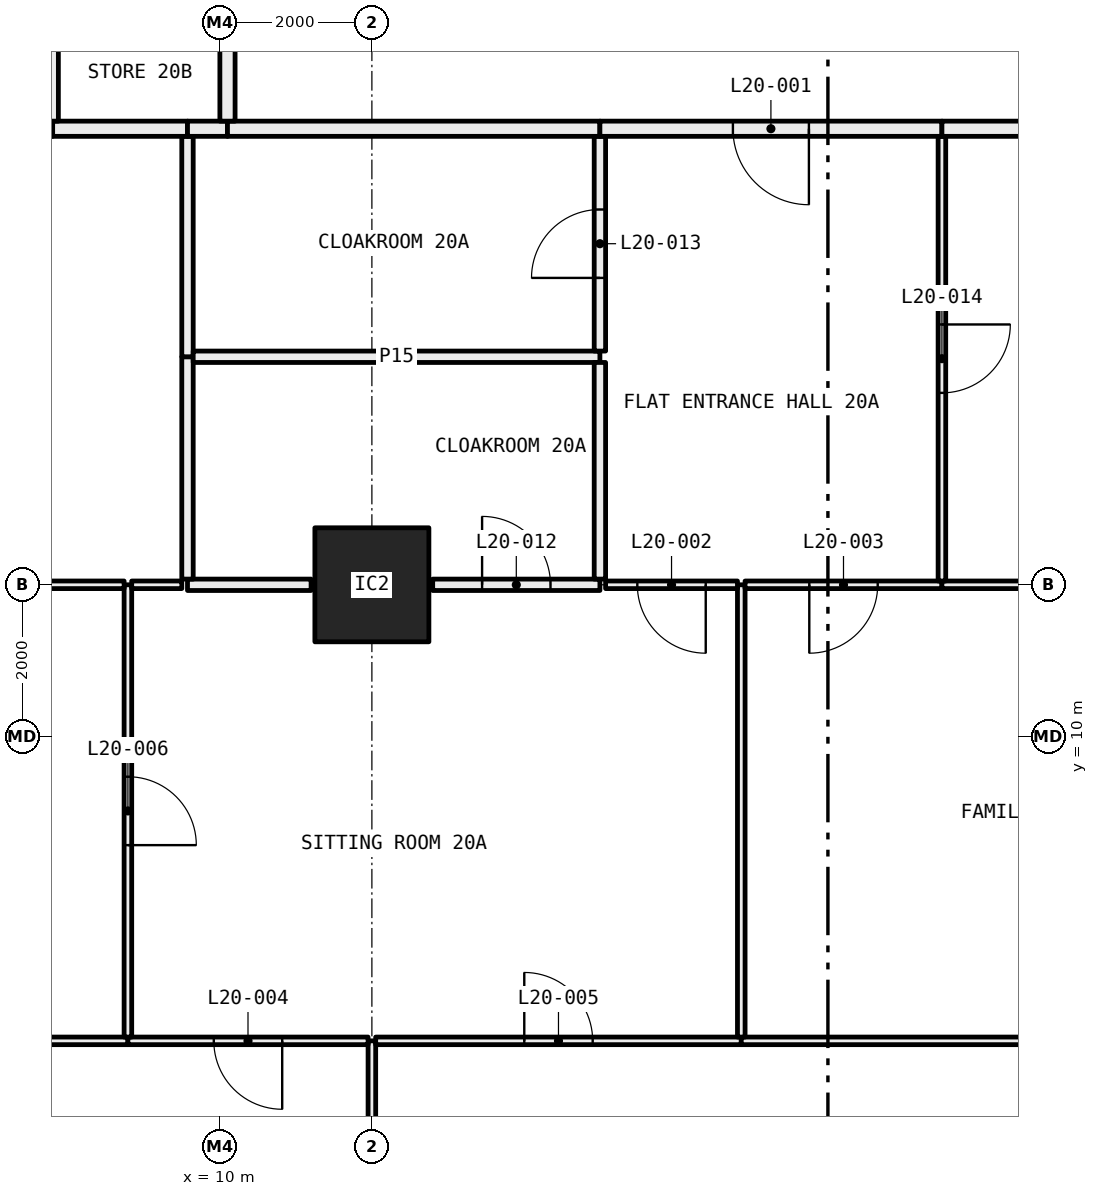
"""IFC4 building model, lengths in metres.
Left out: names, types, materials, properties, quantities, classifications, styles, units other than length and angle.
Written with IfcOpenShell. Run it as: python <this file> out.ifc"""

import sys

from ifc_helpers import new_model, si_unit, direction, frame, frame_2d, origin, origin_2d, place, context, subcontext, project, spatial, rectangle, hollow_rectangle, extrude, element, fill, save


model = new_model("IFC4")
c1 = context("Model", 3, precision=1e-05, world=origin(), true_north=direction((0.0, 1.0)))
c2 = subcontext(c1, "Body", "Model", "MODEL_VIEW")
j1 = project(units=[si_unit("LENGTHUNIT", "METRE"), si_unit("PLANEANGLEUNIT", "RADIAN")], contexts=[c1])
p1 = place(None, origin())
s1 = spatial("IfcSite", under=j1, at=p1, CompositionType="ELEMENT")
p2 = place(p1, origin())
s2 = spatial("IfcBuilding", under=s1, at=p2, CompositionType="ELEMENT")
p3 = place(p2, frame((0.0, 0.0, 81.75)))
s3 = spatial("IfcBuildingStorey", under=s2, at=p3, CompositionType="ELEMENT", Elevation=81.75)
p4 = place(p3, frame((12.0, 12.0, 0.0), z_axis=(0.0, 0.0, 1.0), x_axis=(1.0, 0.0, 0.0)))
e1 = element("IfcColumn", 1, at=p4, inside=s3, PredefinedType="COLUMN", context=c2, shape_type="SweptSolid", body=[
    extrude(hollow_rectangle(XDim=1.5, YDim=1.5, WallThickness=0.065, at=origin_2d()), origin(), (0.0, 0.0, 1.0), 3.05),
])
p5 = place(p3, frame((12.0, 0.72, 0.0), z_axis=(0.0, 0.0, 1.0), x_axis=(0.0, 1.0, 0.0)))
e2 = element("IfcWall", 2, at=p5, inside=s3, PredefinedType="PARTITIONING", context=c2, shape_type="SweptSolid", body=[
    extrude(rectangle(XDim=5.28, YDim=0.1, at=frame_2d((2.64, 0.0))), origin(), (0.0, 0.0, 1.0), 2.45),
])
p6 = place(p3, frame((8.79, 6.0, 0.0), z_axis=(0.0, 0.0, 1.0), x_axis=(-1.0, 0.0, 0.0)))
e3 = element("IfcWall", 3, at=p6, inside=s3, PredefinedType="PARTITIONING", context=c2, shape_type="SweptSolid", body=[
    extrude(rectangle(XDim=2.07, YDim=0.1, at=frame_2d((1.035, 0.0))), origin(), (0.0, 0.0, 1.0), 3.05),
])
p7 = place(p3, frame((11.95, 6.0, 0.0), z_axis=(0.0, 0.0, 1.0), x_axis=(-1.0, 0.0, 0.0)))
e4 = element("IfcWall", 4, at=p7, inside=s3, PredefinedType="PARTITIONING", context=c2, shape_type="SweptSolid", body=[
    extrude(rectangle(XDim=3.16, YDim=0.1, at=frame_2d((1.58, 0.0))), origin(), (0.0, 0.0, 1.0), 2.45),
])
p8 = place(p7, frame((1.13, 0.0, 0.0)))
e5 = element("IfcOpeningElement", 5, at=p8, cuts=e4, PredefinedType="OPENING", context=c2, shape_type="SweptSolid", body=[
    extrude(rectangle(XDim=0.9, YDim=2.1, at=frame_2d((0.45, 1.05))), frame((0.0, 0.06, 0.0), z_axis=(0.0, -1.0, 0.0), x_axis=(1.0, 0.0, 0.0)), (0.0, 0.0, 1.0), 0.12),
])
p9 = place(p3, frame((16.86, 6.0, 0.0), z_axis=(0.0, 0.0, 1.0), x_axis=(-1.0, 0.0, 0.0)))
e6 = element("IfcWall", 6, at=p9, inside=s3, PredefinedType="PARTITIONING", context=c2, shape_type="SweptSolid", body=[
    extrude(rectangle(XDim=4.81, YDim=0.1, at=frame_2d((2.405, 0.0))), origin(), (0.0, 0.0, 1.0), 2.45),
])
p10 = place(p9, frame((1.955, 0.0, 0.0)))
e7 = element("IfcOpeningElement", 7, at=p10, cuts=e6, PredefinedType="OPENING", context=c2, shape_type="SweptSolid", body=[
    extrude(rectangle(XDim=0.9, YDim=2.1, at=frame_2d((0.45, 1.05))), frame((0.0, 0.06, 0.0), z_axis=(0.0, -1.0, 0.0), x_axis=(1.0, 0.0, 0.0)), (0.0, 0.0, 1.0), 0.12),
])
p11 = place(p3, frame((23.95, 6.0, 0.0), z_axis=(0.0, 0.0, 1.0), x_axis=(-1.0, 0.0, 0.0)))
e8 = element("IfcWall", 8, at=p11, inside=s3, PredefinedType="PARTITIONING", context=c2, shape_type="SweptSolid", body=[
    extrude(rectangle(XDim=7.09, YDim=0.1, at=frame_2d((3.545, 0.0))), origin(), (0.0, 0.0, 1.0), 2.45),
])
p12 = place(p3, frame((8.79, 6.05, 0.0), z_axis=(0.0, 0.0, 1.0), x_axis=(0.0, 1.0, 0.0)))
e9 = element("IfcWall", 9, at=p12, inside=s3, PredefinedType="PARTITIONING", context=c2, shape_type="SweptSolid", body=[
    extrude(rectangle(XDim=5.95, YDim=0.1, at=frame_2d((2.975, 0.0))), origin(), (0.0, 0.0, 1.0), 2.45),
])
p13 = place(p12, frame((2.525, 0.0, 0.0)))
e10 = element("IfcOpeningElement", 10, at=p13, cuts=e9, PredefinedType="OPENING", context=c2, shape_type="SweptSolid", body=[
    extrude(rectangle(XDim=0.9, YDim=2.1, at=frame_2d((0.45, 1.05))), frame((0.0, 0.06, 0.0), z_axis=(0.0, -1.0, 0.0), x_axis=(1.0, 0.0, 0.0)), (0.0, 0.0, 1.0), 0.12),
])
p14 = place(p3, frame((8.74, 12.0, 0.0), z_axis=(0.0, 0.0, 1.0), x_axis=(-1.0, 0.0, 0.0)))
e11 = element("IfcWall", 11, at=p14, inside=s3, PredefinedType="PARTITIONING", context=c2, shape_type="SweptSolid", body=[
    extrude(rectangle(XDim=8.02, YDim=0.1, at=frame_2d((4.01, 0.0))), origin(), (0.0, 0.0, 1.0), 2.45),
])
p15 = place(p14, frame((3.56, 0.0, 0.0)))
e12 = element("IfcOpeningElement", 12, at=p15, cuts=e11, PredefinedType="OPENING", context=c2, shape_type="SweptSolid", body=[
    extrude(rectangle(XDim=0.9, YDim=2.1, at=frame_2d((0.45, 1.05))), frame((0.0, 0.06, 0.0), z_axis=(0.0, -1.0, 0.0), x_axis=(1.0, 0.0, 0.0)), (0.0, 0.0, 1.0), 0.12),
])
p16 = place(p3, frame((16.86, 6.05, 0.0), z_axis=(0.0, 0.0, 1.0), x_axis=(0.0, 1.0, 0.0)))
e13 = element("IfcWall", 13, at=p16, inside=s3, PredefinedType="PARTITIONING", context=c2, shape_type="SweptSolid", body=[
    extrude(rectangle(XDim=5.95, YDim=0.1, at=frame_2d((2.975, 0.0))), origin(), (0.0, 0.0, 1.0), 2.45),
])
p17 = place(p3, frame((9.499, 12.0, 0.0), z_axis=(0.0, 0.0, 1.0), x_axis=(-1.0, 0.0, 0.0)))
e14 = element("IfcWall", 14, at=p17, inside=s3, PredefinedType="PARTITIONING", context=c2, shape_type="SweptSolid", body=[
    extrude(rectangle(XDim=0.659, YDim=0.1, at=frame_2d((0.33, 0.0))), origin(), (0.0, 0.0, 1.0), 2.45),
])
p18 = place(p3, frame((11.2, 12.0, 0.0), z_axis=(0.0, 0.0, 1.0), x_axis=(-1.0, 0.0, 0.0)))
e15 = element("IfcWall", 15, at=p18, inside=s3, PredefinedType="PARTITIONING", context=c2, shape_type="SweptSolid", body=[
    extrude(rectangle(XDim=1.626, YDim=0.15, at=frame_2d((0.813, 0.0))), origin(), (0.0, 0.0, 1.0), 2.45),
])
p19 = place(p3, frame((15.0, 12.0, 0.0), z_axis=(0.0, 0.0, 1.0), x_axis=(-1.0, 0.0, 0.0)))
e16 = element("IfcWall", 16, at=p19, inside=s3, PredefinedType="PARTITIONING", context=c2, shape_type="SweptSolid", body=[
    extrude(rectangle(XDim=2.2, YDim=0.15, at=frame_2d((1.1, 0.0))), origin(), (0.0, 0.0, 1.0), 2.45),
])
p20 = place(p19, frame((0.65, 0.0, 0.0)))
e17 = element("IfcOpeningElement", 17, at=p20, cuts=e16, PredefinedType="OPENING", context=c2, shape_type="SweptSolid", body=[
    extrude(rectangle(XDim=0.9, YDim=2.1, at=frame_2d((0.45, 1.05))), frame((0.0, 0.085, 0.0), z_axis=(0.0, -1.0, 0.0), x_axis=(1.0, 0.0, 0.0)), (0.0, 0.0, 1.0), 0.17),
])
p21 = place(p3, frame((16.81, 12.0, 0.0), z_axis=(0.0, 0.0, 1.0), x_axis=(-1.0, 0.0, 0.0)))
e18 = element("IfcWall", 18, at=p21, inside=s3, PredefinedType="PARTITIONING", context=c2, shape_type="SweptSolid", body=[
    extrude(rectangle(XDim=1.735, YDim=0.1, at=frame_2d((0.868, 0.0))), origin(), (0.0, 0.0, 1.0), 2.45),
])
p22 = place(p21, frame((0.417, 0.0, 0.0)))
e19 = element("IfcOpeningElement", 19, at=p22, cuts=e18, PredefinedType="OPENING", context=c2, shape_type="SweptSolid", body=[
    extrude(rectangle(XDim=0.9, YDim=2.1, at=frame_2d((0.45, 1.05))), frame((0.0, 0.06, 0.0), z_axis=(0.0, -1.0, 0.0), x_axis=(1.0, 0.0, 0.0)), (0.0, 0.0, 1.0), 0.12),
])
p23 = place(p3, frame((19.5, 12.0, 0.0), z_axis=(0.0, 0.0, 1.0), x_axis=(-1.0, 0.0, 0.0)))
e20 = element("IfcWall", 20, at=p23, inside=s3, PredefinedType="PARTITIONING", context=c2, shape_type="SweptSolid", body=[
    extrude(rectangle(XDim=2.59, YDim=0.1, at=frame_2d((1.295, 0.0))), origin(), (0.0, 0.0, 1.0), 2.45),
])
p24 = place(p23, frame((0.845, 0.0, 0.0)))
e21 = element("IfcOpeningElement", 21, at=p24, cuts=e20, PredefinedType="OPENING", context=c2, shape_type="SweptSolid", body=[
    extrude(rectangle(XDim=0.9, YDim=2.1, at=frame_2d((0.45, 1.05))), frame((0.0, 0.06, 0.0), z_axis=(0.0, -1.0, 0.0), x_axis=(1.0, 0.0, 0.0)), (0.0, 0.0, 1.0), 0.12),
])
p25 = place(p3, frame((23.2, 12.0, 0.0), z_axis=(0.0, 0.0, 1.0), x_axis=(-1.0, 0.0, 0.0)))
e22 = element("IfcWall", 22, at=p25, inside=s3, PredefinedType="PARTITIONING", context=c2, shape_type="SweptSolid", body=[
    extrude(rectangle(XDim=3.7, YDim=0.1, at=frame_2d((1.85, 0.0))), origin(), (0.0, 0.0, 1.0), 2.45),
])
p26 = place(p3, frame((9.574, 12.075, 0.0), z_axis=(0.0, 0.0, 1.0), x_axis=(0.0, 1.0, 0.0)))
e23 = element("IfcWall", 23, at=p26, inside=s3, PredefinedType="PARTITIONING", context=c2, shape_type="SweptSolid", body=[
    extrude(rectangle(XDim=2.925, YDim=0.15, at=frame_2d((1.462, 0.0))), origin(), (0.0, 0.0, 1.0), 2.45),
])
p27 = place(p3, frame((9.574, 15.0, 0.0), z_axis=(0.0, 0.0, 1.0), x_axis=(0.0, 1.0, 0.0)))
e24 = element("IfcWall", 24, at=p27, inside=s3, PredefinedType="PARTITIONING", context=c2, shape_type="SweptSolid", body=[
    extrude(rectangle(XDim=2.9, YDim=0.15, at=frame_2d((1.45, 0.0))), origin(), (0.0, 0.0, 1.0), 3.05),
])
p28 = place(p3, frame((7.8, 18.0, 0.0), z_axis=(0.0, 0.0, 1.0), x_axis=(-1.0, 0.0, 0.0)))
e25 = element("IfcWall", 25, at=p28, inside=s3, PredefinedType="PARTITIONING", context=c2, shape_type="SweptSolid", body=[
    extrude(rectangle(XDim=1.8, YDim=0.2, at=frame_2d((0.9, 0.0))), origin(), (0.0, 0.0, 1.0), 3.05),
])
p29 = place(p3, frame((9.574, 18.0, 0.0), z_axis=(0.0, 0.0, 1.0), x_axis=(-1.0, 0.0, 0.0)))
e26 = element("IfcWall", 26, at=p29, inside=s3, PredefinedType="PARTITIONING", context=c2, shape_type="SweptSolid", body=[
    extrude(rectangle(XDim=1.774, YDim=0.2, at=frame_2d((0.887, 0.0))), origin(), (0.0, 0.0, 1.0), 3.05),
])
p30 = place(p3, frame((15.0, 15.0, 0.0), z_axis=(0.0, 0.0, 1.0), x_axis=(-1.0, 0.0, 0.0)))
e27 = element("IfcWall", 27, at=p30, inside=s3, PredefinedType="PARTITIONING", context=c2, shape_type="SweptSolid", body=[
    extrude(rectangle(XDim=5.351, YDim=0.15, at=frame_2d((2.676, 0.0))), origin(), (0.0, 0.0, 1.0), 3.05),
])
p31 = place(p3, frame((15.0, 12.075, 0.0), z_axis=(0.0, 0.0, 1.0), x_axis=(0.0, 1.0, 0.0)))
e28 = element("IfcWall", 28, at=p31, inside=s3, PredefinedType="PARTITIONING", context=c2, shape_type="SweptSolid", body=[
    extrude(rectangle(XDim=2.85, YDim=0.15, at=frame_2d((1.425, 0.0))), origin(), (0.0, 0.0, 1.0), 2.45),
])
p32 = place(p3, frame((15.0, 15.075, 0.0), z_axis=(0.0, 0.0, 1.0), x_axis=(0.0, 1.0, 0.0)))
e29 = element("IfcWall", 29, at=p32, inside=s3, PredefinedType="PARTITIONING", context=c2, shape_type="SweptSolid", body=[
    extrude(rectangle(XDim=2.825, YDim=0.15, at=frame_2d((1.413, 0.0))), origin(), (0.0, 0.0, 1.0), 3.05),
])
p33 = place(p32, frame((0.962, 0.0, 0.0)))
e30 = element("IfcOpeningElement", 30, at=p33, cuts=e29, PredefinedType="OPENING", context=c2, shape_type="SweptSolid", body=[
    extrude(rectangle(XDim=0.9, YDim=2.1, at=frame_2d((0.45, 1.05))), frame((0.0, 0.085, 0.0), z_axis=(0.0, -1.0, 0.0), x_axis=(1.0, 0.0, 0.0)), (0.0, 0.0, 1.0), 0.17),
])
p34 = place(p3, frame((10.1, 18.0, 0.0), z_axis=(0.0, 0.0, 1.0), x_axis=(-1.0, 0.0, 0.0)))
e31 = element("IfcWall", 31, at=p34, inside=s3, PredefinedType="PARTITIONING", context=c2, shape_type="SweptSolid", body=[
    extrude(rectangle(XDim=0.526, YDim=0.2, at=frame_2d((0.263, 0.0))), origin(), (0.0, 0.0, 1.0), 3.05),
])
p35 = place(p3, frame((15.0, 18.0, 0.0), z_axis=(0.0, 0.0, 1.0), x_axis=(-1.0, 0.0, 0.0)))
e32 = element("IfcWall", 32, at=p35, inside=s3, PredefinedType="PARTITIONING", context=c2, shape_type="SweptSolid", body=[
    extrude(rectangle(XDim=4.9, YDim=0.2, at=frame_2d((2.45, 0.0))), origin(), (0.0, 0.0, 1.0), 3.05),
])
p36 = place(p3, frame((19.5, 12.05, 0.0), z_axis=(0.0, 0.0, 1.0), x_axis=(0.0, 1.0, 0.0)))
e33 = element("IfcWall", 33, at=p36, inside=s3, PredefinedType="PARTITIONING", context=c2, shape_type="SweptSolid", body=[
    extrude(rectangle(XDim=5.85, YDim=0.1, at=frame_2d((2.925, 0.0))), origin(), (0.0, 0.0, 1.0), 2.45),
])
p37 = place(p36, frame((2.475, 0.0, 0.0)))
e34 = element("IfcOpeningElement", 34, at=p37, cuts=e33, PredefinedType="OPENING", context=c2, shape_type="SweptSolid", body=[
    extrude(rectangle(XDim=0.9, YDim=2.1, at=frame_2d((0.45, 1.05))), frame((0.0, 0.06, 0.0), z_axis=(0.0, -1.0, 0.0), x_axis=(1.0, 0.0, 0.0)), (0.0, 0.0, 1.0), 0.12),
])
p38 = place(p3, frame((19.5, 18.0, 0.0), z_axis=(0.0, 0.0, 1.0), x_axis=(-1.0, 0.0, 0.0)))
e35 = element("IfcWall", 35, at=p38, inside=s3, PredefinedType="PARTITIONING", context=c2, shape_type="SweptSolid", body=[
    extrude(rectangle(XDim=4.5, YDim=0.2, at=frame_2d((2.25, 0.0))), origin(), (0.0, 0.0, 1.0), 3.05),
])
p39 = place(p38, frame((1.75, 0.0, 0.0)))
e36 = element("IfcOpeningElement", 36, at=p39, cuts=e35, PredefinedType="OPENING", context=c2, shape_type="SweptSolid", body=[
    extrude(rectangle(XDim=1.0, YDim=2.1, at=frame_2d((0.5, 1.05))), frame((0.0, 0.11, 0.0), z_axis=(0.0, -1.0, 0.0), x_axis=(1.0, 0.0, 0.0)), (0.0, 0.0, 1.0), 0.22),
])
p40 = place(p3, frame((25.9, 18.0, 0.0), z_axis=(0.0, 0.0, 1.0), x_axis=(-1.0, 0.0, 0.0)))
e37 = element("IfcWall", 37, at=p40, inside=s3, PredefinedType="PARTITIONING", context=c2, shape_type="SweptSolid", body=[
    extrude(rectangle(XDim=6.4, YDim=0.2, at=frame_2d((3.2, 0.0))), origin(), (0.0, 0.0, 1.0), 3.05),
])
p41 = place(p3, frame((7.8, 18.1, 0.0), z_axis=(0.0, 0.0, 1.0), x_axis=(0.0, 1.0, 0.0)))
e38 = element("IfcWall", 38, at=p41, inside=s3, PredefinedType="PARTITIONING", context=c2, shape_type="SweptSolid", body=[
    extrude(rectangle(XDim=2.9, YDim=0.15, at=frame_2d((1.45, 0.0))), origin(), (0.0, 0.0, 1.0), 3.05),
])
p42 = place(p3, frame((10.1, 18.1, 0.0), z_axis=(0.0, 0.0, 1.0), x_axis=(0.0, 1.0, 0.0)))
e39 = element("IfcWall", 39, at=p42, inside=s3, PredefinedType="PARTITIONING", context=c2, shape_type="SweptSolid", body=[
    extrude(rectangle(XDim=2.9, YDim=0.2, at=frame_2d((1.45, 0.0))), origin(), (0.0, 0.0, 1.0), 3.05),
])
p43 = place(p39, origin())
e40 = element("IfcDoor", 40, at=p43, inside=s3, OperationType="SINGLE_SWING_RIGHT", PredefinedType="DOOR", context=c2, shape_type="SweptSolid", body=[
    extrude(rectangle(XDim=1.0, YDim=2.1, at=frame_2d((0.5, 1.05))), frame((0.0, 0.025, 0.0), z_axis=(0.0, -1.0, 0.0), x_axis=(1.0, 0.0, 0.0)), (0.0, 0.0, 1.0), 0.05),
])
fill(e36, e40)
p44 = place(p22, origin())
e41 = element("IfcDoor", 41, at=p44, inside=s3, OperationType="SINGLE_SWING_RIGHT", PredefinedType="DOOR", context=c2, shape_type="SweptSolid", body=[
    extrude(rectangle(XDim=0.9, YDim=2.1, at=frame_2d((0.45, 1.05))), frame((0.0, 0.025, 0.0), z_axis=(0.0, -1.0, 0.0), x_axis=(1.0, 0.0, 0.0)), (0.0, 0.0, 1.0), 0.05),
])
fill(e19, e41)
p45 = place(p24, origin())
e42 = element("IfcDoor", 42, at=p45, inside=s3, OperationType="SINGLE_SWING_LEFT", PredefinedType="DOOR", context=c2, shape_type="SweptSolid", body=[
    extrude(rectangle(XDim=0.9, YDim=2.1, at=frame_2d((0.45, 1.05))), frame((0.0, 0.025, 0.0), z_axis=(0.0, -1.0, 0.0), x_axis=(1.0, 0.0, 0.0)), (0.0, 0.0, 1.0), 0.05),
])
fill(e21, e42)
p46 = place(p8, origin())
e43 = element("IfcDoor", 43, at=p46, inside=s3, OperationType="SINGLE_SWING_RIGHT", PredefinedType="DOOR", context=c2, shape_type="SweptSolid", body=[
    extrude(rectangle(XDim=0.9, YDim=2.1, at=frame_2d((0.45, 1.05))), frame((0.0, 0.025, 0.0), z_axis=(0.0, -1.0, 0.0), x_axis=(1.0, 0.0, 0.0)), (0.0, 0.0, 1.0), 0.05),
])
fill(e5, e43)
p47 = place(p10, frame((0.9, 0.0, 0.0), x_axis=(-1.0, 0.0, 0.0)))
e44 = element("IfcDoor", 44, at=p47, inside=s3, OperationType="SINGLE_SWING_RIGHT", PredefinedType="DOOR", context=c2, shape_type="SweptSolid", body=[
    extrude(rectangle(XDim=0.9, YDim=2.1, at=frame_2d((0.45, 1.05))), frame((0.0, 0.025, 0.0), z_axis=(0.0, -1.0, 0.0), x_axis=(1.0, 0.0, 0.0)), (0.0, 0.0, 1.0), 0.05),
])
fill(e7, e44)
p48 = place(p13, frame((0.9, 0.0, 0.0), x_axis=(-1.0, 0.0, 0.0)))
e45 = element("IfcDoor", 45, at=p48, inside=s3, OperationType="SINGLE_SWING_LEFT", PredefinedType="DOOR", context=c2, shape_type="SweptSolid", body=[
    extrude(rectangle(XDim=0.9, YDim=2.1, at=frame_2d((0.45, 1.05))), frame((0.0, 0.025, 0.0), z_axis=(0.0, -1.0, 0.0), x_axis=(1.0, 0.0, 0.0)), (0.0, 0.0, 1.0), 0.05),
])
fill(e10, e45)
p49 = place(p20, frame((0.9, 0.0, 0.0), x_axis=(-1.0, 0.0, 0.0)))
e46 = element("IfcDoor", 46, at=p49, inside=s3, OperationType="SINGLE_SWING_RIGHT", PredefinedType="DOOR", context=c2, shape_type="SweptSolid", body=[
    extrude(rectangle(XDim=0.9, YDim=2.1, at=frame_2d((0.45, 1.05))), frame((0.0, 0.025, 0.0), z_axis=(0.0, -1.0, 0.0), x_axis=(1.0, 0.0, 0.0)), (0.0, 0.0, 1.0), 0.05),
])
fill(e17, e46)
p50 = place(p33, origin())
e47 = element("IfcDoor", 47, at=p50, inside=s3, OperationType="SINGLE_SWING_RIGHT", PredefinedType="DOOR", context=c2, shape_type="SweptSolid", body=[
    extrude(rectangle(XDim=0.9, YDim=2.1, at=frame_2d((0.45, 1.05))), frame((0.0, 0.025, 0.0), z_axis=(0.0, -1.0, 0.0), x_axis=(1.0, 0.0, 0.0)), (0.0, 0.0, 1.0), 0.05),
])
fill(e30, e47)
p51 = place(p37, frame((0.9, 0.0, 0.0), x_axis=(-1.0, 0.0, 0.0)))
e48 = element("IfcDoor", 48, at=p51, inside=s3, OperationType="SINGLE_SWING_RIGHT", PredefinedType="DOOR", context=c2, shape_type="SweptSolid", body=[
    extrude(rectangle(XDim=0.9, YDim=2.1, at=frame_2d((0.45, 1.05))), frame((0.0, 0.025, 0.0), z_axis=(0.0, -1.0, 0.0), x_axis=(1.0, 0.0, 0.0)), (0.0, 0.0, 1.0), 0.05),
])
fill(e34, e48)
save(model, sys.argv[1])
